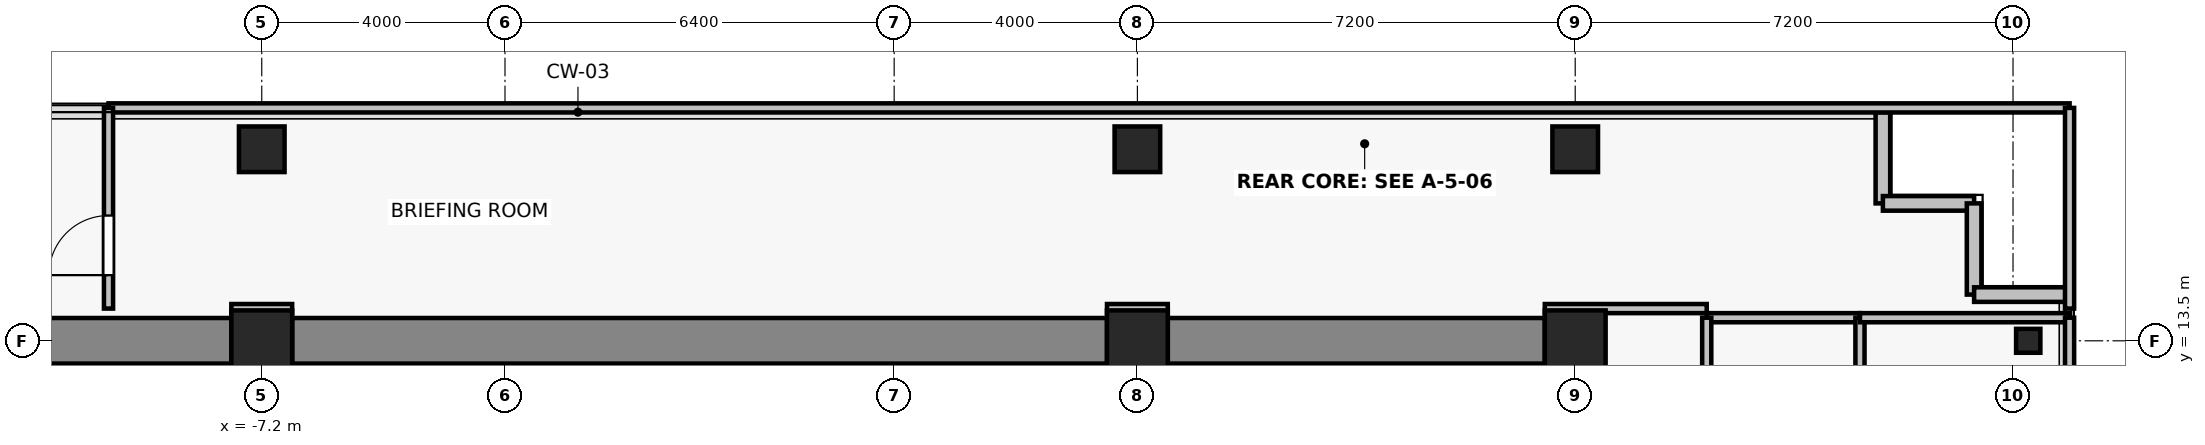
"""IFC4 building model, lengths in metres.
Left out: names, types, materials, properties, quantities, classifications, styles, units other than length and angle.
Written with IfcOpenShell. Run it as: python <this file> out.ifc"""

import sys

from ifc_helpers import new_model, si_unit, direction, frame, frame_2d, origin, origin_2d, place, context, subcontext, project, spatial, rectangle, i_section, extrude, source, transform, mapped, element, fill, save


model = new_model("IFC4")
c1 = context("Model", 3, precision=1e-05, world=origin(), true_north=direction((0.0, 1.0)))
c2 = subcontext(c1, "Body", "Model", "MODEL_VIEW")
j1 = project(units=[si_unit("LENGTHUNIT", "METRE"), si_unit("PLANEANGLEUNIT", "RADIAN")], contexts=[c1])
p1 = place(None, origin())
s1 = spatial("IfcSite", under=j1, at=p1, CompositionType="ELEMENT")
p2 = place(p1, origin())
s2 = spatial("IfcBuilding", under=s1, at=p2, CompositionType="ELEMENT")
p3 = place(p2, frame((0.0, 0.0, 146.2)))
s3 = spatial("IfcBuildingStorey", under=s2, at=p3, CompositionType="ELEMENT", Elevation=146.2)
for number, where, z_axis, x_axis in (
    (1, (-7.2, 13.5, 0.0), (0.0, 0.0, 1.0), (1.0, 0.0, 0.0)),
    (2, (7.2, 13.5, 0.0), (0.0, 0.0, 1.0), (1.0, 0.0, 0.0)),
    (3, (14.4, 13.5, 0.0), (0.0, 0.0, 1.0), (1.0, 0.0, 0.0)),
):
    element("IfcColumn", number, at=place(p3, frame(where, z_axis=z_axis, x_axis=x_axis)), inside=s3, PredefinedType="COLUMN", context=c2, shape_type="SweptSolid", body=[
        extrude(rectangle(XDim=1.0, YDim=1.0, at=origin_2d()), origin(), (0.0, 0.0, 1.0), 3.3),
    ])
for number, where, z_axis, x_axis in (
    (4, (-7.2, 16.65, 0.0), (0.0, 0.0, 1.0), (1.0, 0.0, 0.0)),
    (5, (7.2, 16.65, 0.0), (0.0, 0.0, 1.0), (1.0, 0.0, 0.0)),
    (6, (14.4, 16.65, 0.0), (0.0, 0.0, 1.0), (1.0, 0.0, 0.0)),
):
    element("IfcColumn", number, at=place(p3, frame(where, z_axis=z_axis, x_axis=x_axis)), inside=s3, PredefinedType="COLUMN", context=c2, shape_type="SweptSolid", body=[
        extrude(rectangle(XDim=0.75, YDim=0.75, at=origin_2d()), origin(), (0.0, 0.0, 1.0), 3.3),
    ])
p4 = place(p3, frame((21.85, 13.5, 0.0), z_axis=(0.0, 0.0, 1.0), x_axis=(1.0, 0.0, 0.0)))
e7 = element("IfcColumn", 7, at=p4, inside=s3, PredefinedType="COLUMN", context=c2, shape_type="SweptSolid", body=[
    extrude(i_section(OverallWidth=0.399, OverallDepth=0.394, WebThickness=0.023, FlangeThickness=0.037, FilletRadius=0.015, at=origin_2d()), origin(), (0.0, 0.0, 1.0), 3.3),
])
p5 = place(p3, frame((-13.9, 13.5, 0.0), z_axis=(0.0, 0.0, 1.0), x_axis=(1.0, 0.0, 0.0)))
e8 = element("IfcWall", 8, at=p5, inside=s3, PredefinedType="SHEAR", context=c2, shape_type="SweptSolid", body=[
    extrude(rectangle(XDim=6.2, YDim=0.75, at=frame_2d((3.1, 0.0))), origin(), (0.0, 0.0, 1.0), 3.075),
])
p6 = place(p3, frame((-6.7, 13.5, 0.0), z_axis=(0.0, 0.0, 1.0), x_axis=(1.0, 0.0, 0.0)))
e9 = element("IfcWall", 9, at=p6, inside=s3, PredefinedType="SHEAR", context=c2, shape_type="SweptSolid", body=[
    extrude(rectangle(XDim=13.4, YDim=0.75, at=frame_2d((6.7, 0.0))), origin(), (0.0, 0.0, 1.0), 3.075),
])
p7 = place(p3, frame((7.7, 13.5, 0.0), z_axis=(0.0, 0.0, 1.0), x_axis=(1.0, 0.0, 0.0)))
e10 = element("IfcWall", 10, at=p7, inside=s3, PredefinedType="SHEAR", context=c2, shape_type="SweptSolid", body=[
    extrude(rectangle(XDim=6.2, YDim=0.75, at=frame_2d((3.1, 0.0))), origin(), (0.0, 0.0, 1.0), 3.075),
])
for number, where, z_axis, x_axis in (
    (11, (19.46, 15.76, 0.0), (0.0, 0.0, 1.0), (0.0, 1.0, 0.0)),
    (12, (20.96, 15.76, 0.0), (0.0, 0.0, 1.0), (-1.0, 0.0, 0.0)),
    (13, (20.96, 14.26, 0.0), (0.0, 0.0, 1.0), (0.0, 1.0, 0.0)),
    (14, (22.46, 14.26, 0.0), (0.0, 0.0, 1.0), (-1.0, 0.0, 0.0)),
):
    element("IfcWall", number, at=place(p3, frame(where, z_axis=z_axis, x_axis=x_axis)), inside=s3, PredefinedType="SOLIDWALL", context=c2, shape_type="SweptSolid", body=[
        extrude(rectangle(XDim=1.5, YDim=0.24, at=frame_2d((0.75, 0.0))), origin(), (0.0, 0.0, 1.0), 3.075),
    ])
p8 = place(p3, frame((16.563, 13.88, 0.0), z_axis=(0.0, 0.0, 1.0), x_axis=(1.0, 0.0, 0.0)))
e15 = element("IfcWall", 15, at=p8, inside=s3, PredefinedType="PARTITIONING", context=c2, shape_type="SweptSolid", body=[
    extrude(rectangle(XDim=2.52, YDim=0.15, at=frame_2d((1.26, 0.0))), origin(), (0.0, 0.0, 1.0), 3.075),
])
for number, where, z_axis, x_axis in (
    (16, (16.563, -1.77, 0.0), (0.0, 0.0, 1.0), (0.0, 1.0, 0.0)),
    (17, (19.083, 13.88, 0.0), (0.0, 0.0, 1.0), (0.0, -1.0, 0.0)),
):
    element("IfcWall", number, at=place(p3, frame(where, z_axis=z_axis, x_axis=x_axis)), inside=s3, PredefinedType="PARTITIONING", context=c2, shape_type="SweptSolid", body=[
        extrude(rectangle(XDim=15.65, YDim=0.15, at=frame_2d((7.825, 0.0))), origin(), (0.0, 0.0, 1.0), 2.565),
    ])
p9 = place(p3, frame((19.083, 13.88, 0.0), z_axis=(0.0, 0.0, 1.0), x_axis=(1.0, 0.0, 0.0)))
e18 = element("IfcWall", 18, at=p9, inside=s3, PredefinedType="PARTITIONING", context=c2, shape_type="SweptSolid", body=[
    extrude(rectangle(XDim=3.447, YDim=0.15, at=frame_2d((1.724, 0.0))), origin(), (0.0, 0.0, 1.0), 3.075),
])
p10 = place(p3, frame((22.53, 13.88, 0.0), z_axis=(0.0, 0.0, 1.0), x_axis=(0.0, -1.0, 0.0)))
e19 = element("IfcWall", 19, at=p10, inside=s3, PredefinedType="PARTITIONING", context=c2, shape_type="SweptSolid", body=[
    extrude(rectangle(XDim=15.65, YDim=0.15, at=frame_2d((7.825, 0.0))), origin(), (0.0, 0.0, 1.0), 3.075),
])
for number, where, z_axis, x_axis in (
    (20, (-6.7, 14.03, 0.0), (0.0, 0.0, 1.0), (-1.0, 0.0, 0.0)),
    (21, (7.7, 14.03, 0.0), (0.0, 0.0, 1.0), (-1.0, 0.0, 0.0)),
):
    element("IfcWall", number, at=place(p3, frame(where, z_axis=z_axis, x_axis=x_axis)), inside=s3, PredefinedType="PARTITIONING", context=c2, shape_type="SweptSolid", body=[
        extrude(rectangle(XDim=1.0, YDim=0.15, at=frame_2d((0.5, 0.0))), origin(), (0.0, 0.0, 1.0), 2.565),
    ])
p11 = place(p3, frame((16.563, 14.03, 0.0), z_axis=(0.0, 0.0, 1.0), x_axis=(-1.0, 0.0, 0.0)))
e22 = element("IfcWall", 22, at=p11, inside=s3, PredefinedType="PARTITIONING", context=c2, shape_type="SweptSolid", body=[
    extrude(rectangle(XDim=2.663, YDim=0.15, at=frame_2d((1.332, 0.0))), origin(), (0.0, 0.0, 1.0), 2.565),
])
p12 = place(p3, frame((-9.72, 17.33, 0.0), z_axis=(0.0, 0.0, 1.0), x_axis=(1.0, 0.0, 0.0)))
e23 = element("IfcWall", 23, at=p12, inside=s3, PredefinedType="PARTITIONING", context=c2, shape_type="SweptSolid", body=[
    extrude(rectangle(XDim=32.25, YDim=0.15, at=frame_2d((16.125, 0.0))), origin(), (0.0, 0.0, 1.0), 3.075),
])
p13 = place(p3, frame((-9.72, 14.03, 0.0), z_axis=(0.0, 0.0, 1.0), x_axis=(0.0, 1.0, 0.0)))
e24 = element("IfcWall", 24, at=p13, inside=s3, PredefinedType="PARTITIONING", context=c2, shape_type="SweptSolid", body=[
    extrude(rectangle(XDim=3.3, YDim=0.15, at=frame_2d((1.65, 0.0))), origin(), (0.0, 0.0, 1.0), 2.565),
])
p14 = place(p13, frame((0.55, 0.0, 0.0)))
e25 = element("IfcOpeningElement", 25, at=p14, cuts=e24, PredefinedType="OPENING", context=c2, shape_type="SweptSolid", body=[
    extrude(rectangle(XDim=0.98, YDim=2.15, at=frame_2d((0.49, 1.075))), frame((0.0, 0.085, 0.0), z_axis=(0.0, -1.0, 0.0), x_axis=(1.0, 0.0, 0.0)), (0.0, 0.0, 1.0), 0.17),
])
p15 = place(p3, frame((22.53, 17.33, 0.0), z_axis=(0.0, 0.0, 1.0), x_axis=(0.0, -1.0, 0.0)))
e26 = element("IfcWall", 26, at=p15, inside=s3, PredefinedType="PARTITIONING", context=c2, shape_type="SweptSolid", body=[
    extrude(rectangle(XDim=3.3, YDim=0.15, at=frame_2d((1.65, 0.0))), origin(), (0.0, 0.0, 1.0), 3.075),
])
m1 = source(origin(), c2, "Body", "SweptSolid", [
    extrude(rectangle(XDim=0.98, YDim=2.15, at=frame_2d((0.49, 1.075))), frame((0.0, 0.025, 0.0), z_axis=(0.0, -1.0, 0.0), x_axis=(1.0, 0.0, 0.0)), (0.0, 0.0, 1.0), 0.05),
])
p16 = place(p14, origin())
e27 = element("IfcDoor", 27, at=p16, inside=s3, OperationType="SINGLE_SWING_LEFT", PredefinedType="DOOR", context=c2, shape_type="MappedRepresentation", body=[
    mapped(m1, transform((0.0, 0.0, 0.0), x_axis=(1.0, 0.0, 0.0), y_axis=(0.0, 1.0, 0.0), z_axis=(0.0, 0.0, 1.0), scale=1.0)),
])
fill(e25, e27)
save(model, sys.argv[1])
